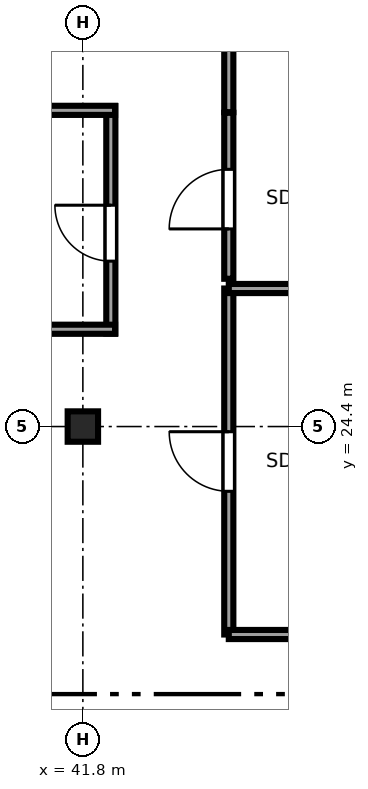
"""IFC4 building model, lengths in metres.
Left out: names, types, materials, properties, quantities, classifications, styles, units other than length and angle.
Written with IfcOpenShell. Run it as: python <this file> out.ifc"""

import sys

from ifc_helpers import new_model, si_unit, direction, frame, frame_2d, origin, origin_2d, place, context, subcontext, project, spatial, rectangle, i_section, extrude, source, transform, mapped, element, fill, save


model = new_model("IFC4")
c1 = context("Model", 3, precision=1e-05, world=origin(), true_north=direction((0.0, 1.0)))
c2 = subcontext(c1, "Body", "Model", "MODEL_VIEW")
j1 = project(units=[si_unit("LENGTHUNIT", "METRE"), si_unit("PLANEANGLEUNIT", "RADIAN")], contexts=[c1])
p1 = place(None, origin())
s1 = spatial("IfcSite", under=j1, at=p1, CompositionType="ELEMENT")
p2 = place(p1, origin())
s2 = spatial("IfcBuilding", under=s1, at=p2, CompositionType="ELEMENT")
p3 = place(p2, frame((0.0, 0.0, 67.5)))
s3 = spatial("IfcBuildingStorey", under=s2, at=p3, CompositionType="ELEMENT", Elevation=67.5)
m1 = source(origin(), c2, "Body", "SweptSolid", [
    extrude(i_section(OverallWidth=0.5, OverallDepth=0.5, WebThickness=0.028, FlangeThickness=0.045, at=origin_2d()), origin(), (0.0, 0.0, 1.0), 3.55),
])
p4 = place(p3, frame((41.8, 24.4, 0.0), z_axis=(0.0, 0.0, 1.0), x_axis=(1.0, 0.0, 0.0)))
e1 = element("IfcColumn", 1, at=p4, inside=s3, PredefinedType="COLUMN", context=c2, shape_type="MappedRepresentation", body=[
    mapped(m1, transform((0.0, 0.0, 0.0), x_axis=(1.0, 0.0, 0.0), y_axis=(0.0, 1.0, 0.0), z_axis=(0.0, 0.0, 1.0), scale=1.0)),
])
p5 = place(p3, frame((44.2, 20.98, 0.0), z_axis=(0.0, 0.0, 1.0), x_axis=(0.0, 1.0, 0.0)))
e2 = element("IfcWall", 2, at=p5, inside=s3, PredefinedType="PARTITIONING", context=c2, shape_type="SweptSolid", body=[
    extrude(rectangle(XDim=5.69, YDim=0.15, at=frame_2d((2.845, 0.0))), origin(), (0.0, 0.0, 1.0), 3.37),
])
p6 = place(p5, frame((2.355, 0.0, 0.0)))
e3 = element("IfcOpeningElement", 3, at=p6, cuts=e2, PredefinedType="OPENING", context=c2, shape_type="SweptSolid", body=[
    extrude(rectangle(XDim=0.98, YDim=2.12, at=frame_2d((0.49, 1.06))), frame((0.0, 0.085, 0.0), z_axis=(0.0, -1.0, 0.0), x_axis=(1.0, 0.0, 0.0)), (0.0, 0.0, 1.0), 0.17),
])
p7 = place(p3, frame((44.2, 20.98, 0.0), z_axis=(0.0, 0.0, 1.0), x_axis=(1.0, 0.0, 0.0)))
e4 = element("IfcWall", 4, at=p7, inside=s3, PredefinedType="PARTITIONING", context=c2, shape_type="SweptSolid", body=[
    extrude(rectangle(XDim=12.395, YDim=0.15, at=frame_2d((6.198, 0.0))), origin(), (0.0, 0.0, 1.0), 3.37),
])
p8 = place(p3, frame((44.2, 26.67, 0.0), z_axis=(0.0, 0.0, 1.0), x_axis=(1.0, 0.0, 0.0)))
e5 = element("IfcWall", 5, at=p8, inside=s3, PredefinedType="PARTITIONING", context=c2, shape_type="SweptSolid", body=[
    extrude(rectangle(XDim=10.03, YDim=0.15, at=frame_2d((5.015, 0.0))), origin(), (0.0, 0.0, 1.0), 3.37),
])
p9 = place(p3, frame((44.2, 26.83, 0.0), z_axis=(0.0, 0.0, 1.0), x_axis=(0.0, 1.0, 0.0)))
e6 = element("IfcWall", 6, at=p9, inside=s3, PredefinedType="PARTITIONING", context=c2, shape_type="SweptSolid", body=[
    extrude(rectangle(XDim=2.73, YDim=0.15, at=frame_2d((1.365, 0.0))), origin(), (0.0, 0.0, 1.0), 3.37),
])
p10 = place(p9, frame((0.82, 0.0, 0.0)))
e7 = element("IfcOpeningElement", 7, at=p10, cuts=e6, PredefinedType="OPENING", context=c2, shape_type="SweptSolid", body=[
    extrude(rectangle(XDim=0.98, YDim=2.12, at=frame_2d((0.49, 1.06))), frame((0.0, 0.085, 0.0), z_axis=(0.0, -1.0, 0.0), x_axis=(1.0, 0.0, 0.0)), (0.0, 0.0, 1.0), 0.17),
])
p11 = place(p3, frame((44.2, 29.57, 0.0), z_axis=(0.0, 0.0, 1.0), x_axis=(0.0, 1.0, 0.0)))
e8 = element("IfcWall", 8, at=p11, inside=s3, PredefinedType="PARTITIONING", context=c2, shape_type="SweptSolid", body=[
    extrude(rectangle(XDim=16.025, YDim=0.15, at=frame_2d((8.012, 0.0))), origin(), (0.0, 0.0, 1.0), 3.37),
])
p12 = place(p3, frame((42.26, 25.93, 0.0), z_axis=(0.0, 0.0, 1.0), x_axis=(0.0, 1.0, 0.0)))
e9 = element("IfcWall", 9, at=p12, inside=s3, PredefinedType="PARTITIONING", context=c2, shape_type="SweptSolid", body=[
    extrude(rectangle(XDim=3.74, YDim=0.15, at=frame_2d((1.87, 0.0))), origin(), (0.0, 0.0, 1.0), 3.37),
])
p13 = place(p12, frame((1.19, 0.0, 0.0)))
e10 = element("IfcOpeningElement", 10, at=p13, cuts=e9, PredefinedType="OPENING", context=c2, shape_type="SweptSolid", body=[
    extrude(rectangle(XDim=0.92, YDim=2.01, at=frame_2d((0.46, 1.005))), frame((0.0, 0.085, 0.0), z_axis=(0.0, -1.0, 0.0), x_axis=(1.0, 0.0, 0.0)), (0.0, 0.0, 1.0), 0.17),
])
for number, where, z_axis, x_axis in (
    (11, (37.93, 26.0, 0.0), (0.0, 0.0, 1.0), (1.0, 0.0, 0.0)),
    (12, (37.93, 29.6, 0.0), (0.0, 0.0, 1.0), (1.0, 0.0, 0.0)),
):
    element("IfcWall", number, at=place(p3, frame(where, z_axis=z_axis, x_axis=x_axis)), inside=s3, PredefinedType="PARTITIONING", context=c2, shape_type="SweptSolid", body=[
        extrude(rectangle(XDim=4.4, YDim=0.15, at=frame_2d((2.2, 0.0))), origin(), (0.0, 0.0, 1.0), 3.37),
    ])
m2 = source(origin(), c2, "Body", "SweptSolid", [
    extrude(rectangle(XDim=0.98, YDim=2.12, at=frame_2d((0.49, 1.06))), frame((0.0, 0.025, 0.0), z_axis=(0.0, -1.0, 0.0), x_axis=(1.0, 0.0, 0.0)), (0.0, 0.0, 1.0), 0.05),
])
p14 = place(p6, origin())
e13 = element("IfcDoor", 13, at=p14, inside=s3, OperationType="SINGLE_SWING_RIGHT", PredefinedType="DOOR", context=c2, shape_type="MappedRepresentation", body=[
    mapped(m2, transform((0.0, 0.0, 0.0), x_axis=(1.0, 0.0, 0.0), y_axis=(0.0, 1.0, 0.0), z_axis=(0.0, 0.0, 1.0), scale=1.0)),
])
fill(e3, e13)
p15 = place(p10, origin())
e14 = element("IfcDoor", 14, at=p15, inside=s3, OperationType="SINGLE_SWING_LEFT", PredefinedType="DOOR", context=c2, shape_type="MappedRepresentation", body=[
    mapped(m2, transform((0.0, 0.0, 0.0), x_axis=(1.0, 0.0, 0.0), y_axis=(0.0, 1.0, 0.0), z_axis=(0.0, 0.0, 1.0), scale=1.0)),
])
fill(e7, e14)
m3 = source(origin(), c2, "Body", "SweptSolid", [
    extrude(rectangle(XDim=0.92, YDim=2.01, at=frame_2d((0.46, 1.005))), frame((0.0, 0.025, 0.0), z_axis=(0.0, -1.0, 0.0), x_axis=(1.0, 0.0, 0.0)), (0.0, 0.0, 1.0), 0.05),
])
p16 = place(p13, origin())
e15 = element("IfcDoor", 15, at=p16, inside=s3, OperationType="SINGLE_SWING_RIGHT", PredefinedType="DOOR", context=c2, shape_type="MappedRepresentation", body=[
    mapped(m3, transform((0.0, 0.0, 0.0), x_axis=(1.0, 0.0, 0.0), y_axis=(0.0, 1.0, 0.0), z_axis=(0.0, 0.0, 1.0), scale=1.0)),
])
fill(e10, e15)
save(model, sys.argv[1])
